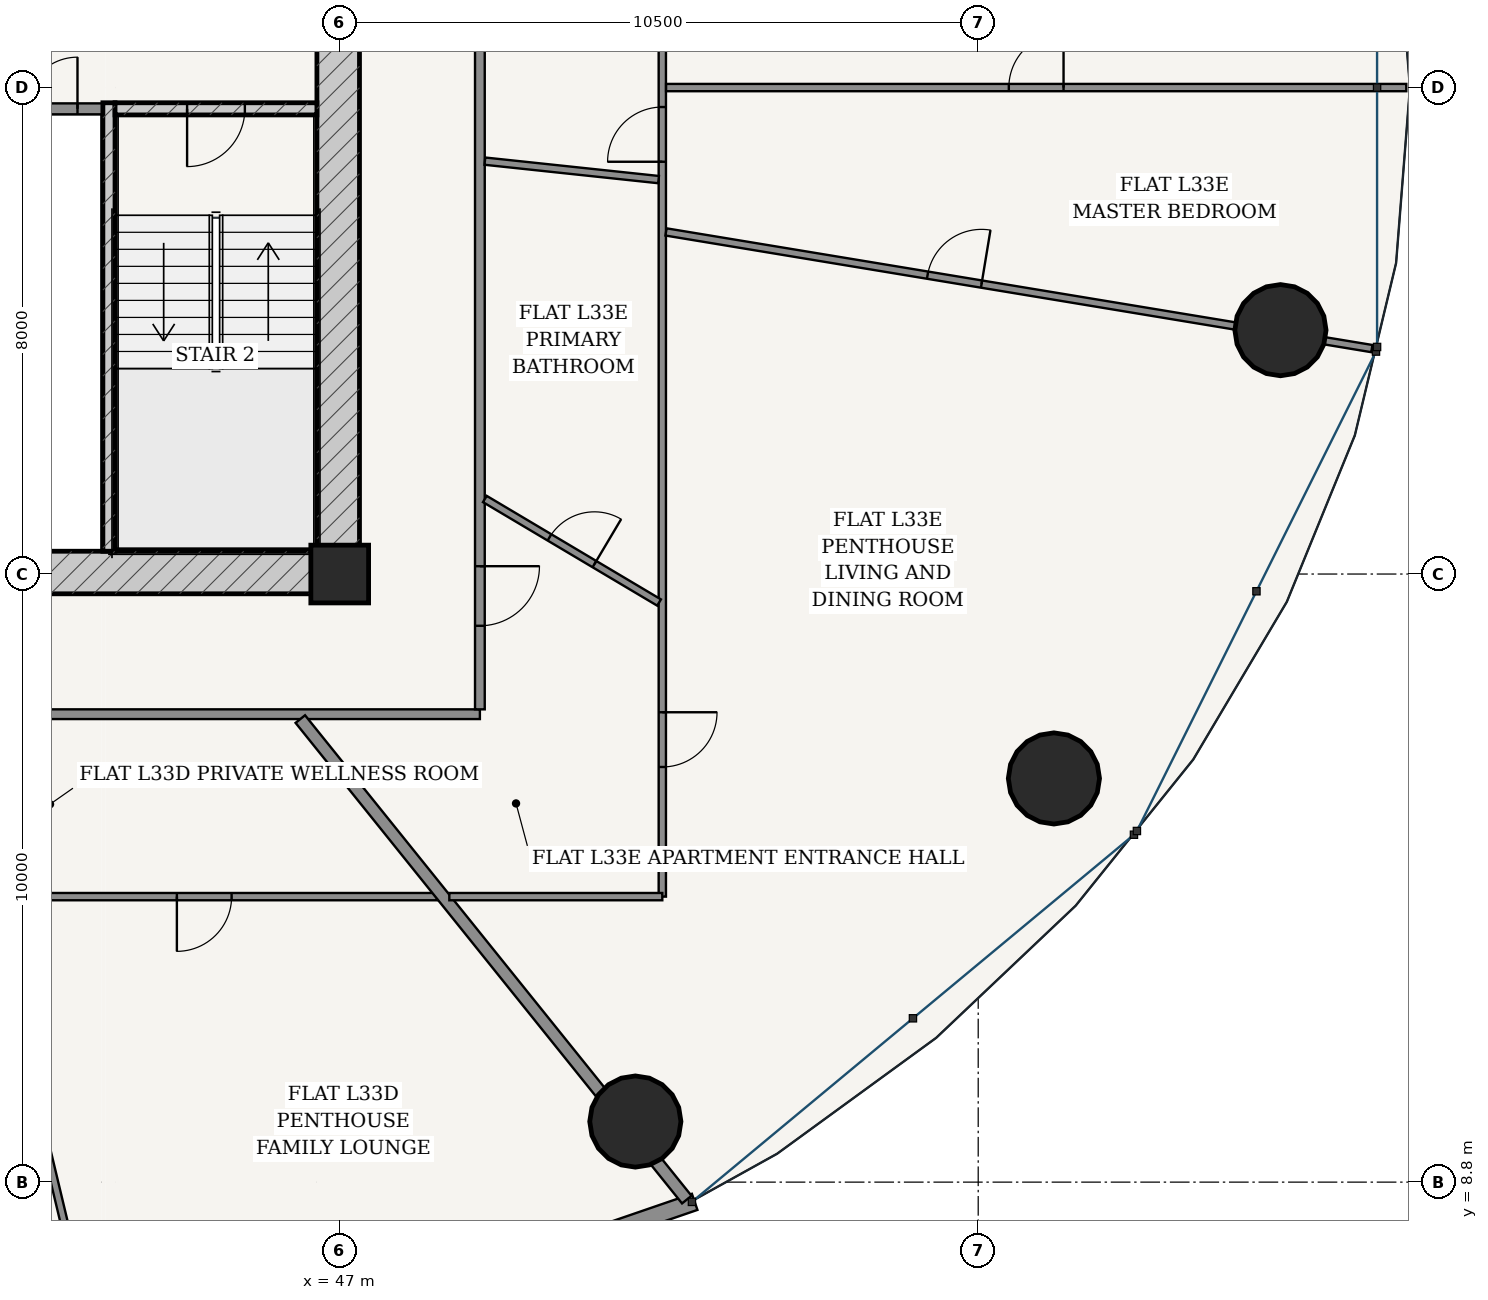
"""IFC4 building model, lengths in metres.
Left out: names, types, materials, properties, quantities, classifications, styles, units other than length and angle.
Written with IfcOpenShell. Run it as: python <this file> out.ifc"""

import sys

from ifc_helpers import new_model, si_unit, direction, frame, frame_2d, origin, origin_2d, place, context, subcontext, project, spatial, rectangle, hollow_circle, extrude, source, transform, mapped, element, fill, save


model = new_model("IFC4")
c1 = context("Model", 3, precision=1e-05, world=origin(), true_north=direction((-0.2419218956, 0.970295726276)))
c2 = subcontext(c1, "Body", "Model", "MODEL_VIEW")
j1 = project(units=[si_unit("LENGTHUNIT", "METRE"), si_unit("PLANEANGLEUNIT", "RADIAN")], contexts=[c1])
p1 = place(None, origin())
s1 = spatial("IfcSite", under=j1, at=p1, CompositionType="ELEMENT")
p2 = place(p1, origin())
s2 = spatial("IfcBuilding", under=s1, at=p2, CompositionType="ELEMENT")
p3 = place(p2, frame((0.0, 0.0, 126.6)))
s3 = spatial("IfcBuildingStorey", under=s2, at=p3, CompositionType="ELEMENT", Elevation=126.6)
p4 = place(p3, frame((47.0, 18.8, 0.0), z_axis=(0.0, 0.0, 1.0), x_axis=(1.0, 0.0, 0.0)))
e1 = element("IfcColumn", 1, at=p4, inside=s3, PredefinedType="COLUMN", context=c2, shape_type="SweptSolid", body=[
    extrude(rectangle(XDim=0.95, YDim=0.95, at=origin_2d()), origin(), (0.0, 0.0, 1.0), 3.6),
])
p5 = place(p3, frame((28.675, 18.825, 0.0), z_axis=(0.0, 0.0, 1.0), x_axis=(1.0, 0.0, 0.0)))
e2 = element("IfcWall", 2, at=p5, inside=s3, PredefinedType="SHEAR", context=c2, shape_type="SweptSolid", body=[
    extrude(rectangle(XDim=18.65, YDim=0.7, at=frame_2d((9.325, 0.0))), origin(), (0.0, 0.0, 1.0), 3.15),
])
p6 = place(p5, frame((8.9, 0.0, 0.0)))
e3 = element("IfcOpeningElement", 3, at=p6, cuts=e2, PredefinedType="OPENING", context=c2, shape_type="SweptSolid", body=[
    extrude(rectangle(XDim=0.85, YDim=2.1, at=frame_2d((0.425, 1.05))), frame((0.0, 0.36, 0.0), z_axis=(0.0, -1.0, 0.0), x_axis=(1.0, 0.0, 0.0)), (0.0, 0.0, 1.0), 0.72),
])
p7 = place(p3, frame((46.975, 19.175, 0.0), z_axis=(0.0, 0.0, 1.0), x_axis=(0.0, 1.0, 0.0)))
e4 = element("IfcWall", 4, at=p7, inside=s3, PredefinedType="SHEAR", context=c2, shape_type="SweptSolid", body=[
    extrude(rectangle(XDim=15.25, YDim=0.7, at=frame_2d((7.625, 0.0))), origin(), (0.0, 0.0, 1.0), 3.15),
])
p8 = place(p7, frame((9.875, 0.0, 0.0)))
e5 = element("IfcOpeningElement", 5, at=p8, cuts=e4, PredefinedType="OPENING", context=c2, shape_type="SweptSolid", body=[
    extrude(rectangle(XDim=1.5, YDim=2.2, at=frame_2d((0.75, 1.1))), frame((0.0, 0.36, 0.0), z_axis=(0.0, -1.0, 0.0), x_axis=(1.0, 0.0, 0.0)), (0.0, 0.0, 1.0), 0.72),
])
p9 = place(p3, frame((43.205, 19.175, 0.0), z_axis=(0.0, 0.0, 1.0), x_axis=(0.0, 1.0, 0.0)))
e6 = element("IfcWall", 6, at=p9, inside=s3, PredefinedType="SOLIDWALL", context=c2, shape_type="SweptSolid", body=[
    extrude(rectangle(XDim=7.375, YDim=0.2, at=frame_2d((3.688, 0.0))), origin(), (0.0, 0.0, 1.0), 3.15),
])
p10 = place(p3, frame((43.305, 26.45, 0.0), z_axis=(0.0, 0.0, 1.0), x_axis=(1.0, 0.0, 0.0)))
e7 = element("IfcWall", 7, at=p10, inside=s3, PredefinedType="SOLIDWALL", context=c2, shape_type="SweptSolid", body=[
    extrude(rectangle(XDim=3.32, YDim=0.2, at=frame_2d((1.66, 0.0))), origin(), (0.0, 0.0, 1.0), 3.15),
])
p11 = place(p10, frame((1.185, 0.0, 0.0)))
e8 = element("IfcOpeningElement", 8, at=p11, cuts=e7, PredefinedType="OPENING", context=c2, shape_type="SweptSolid", body=[
    extrude(rectangle(XDim=0.95, YDim=2.15, at=frame_2d((0.475, 1.075))), frame((0.0, 0.11, 0.0), z_axis=(0.0, -1.0, 0.0), x_axis=(1.0, 0.0, 0.0)), (0.0, 0.0, 1.0), 0.22),
])
for number, where, z_axis, x_axis in (
    (9, (51.862, 9.796, 0.0), (0.0, 0.0, 1.0), (1.0, 0.0, 0.0)),
    (10, (58.745, 15.438, 0.0), (0.0, 0.0, 1.0), (1.0, 0.0, 0.0)),
    (11, (62.471, 22.81, 0.0), (0.0, 0.0, 1.0), (1.0, 0.0, 0.0)),
):
    element("IfcColumn", number, at=place(p3, frame(where, z_axis=z_axis, x_axis=x_axis)), inside=s3, PredefinedType="COLUMN", context=c2, shape_type="SweptSolid", body=[
        extrude(hollow_circle(Radius=0.75, WallThickness=0.045, at=origin_2d()), origin(), (0.0, 0.0, 1.0), 3.6),
    ])
p12 = place(p3, frame((43.108, 5.128, 0.0), z_axis=(0.0, 0.0, 1.0), x_axis=(0.945590132341, 0.325360264351, 0.0)))
e12 = element("IfcWall", 12, at=p12, inside=s3, PredefinedType="SOLIDWALL", context=c2, shape_type="SweptSolid", body=[
    extrude(rectangle(XDim=10.289, YDim=0.28, at=frame_2d((5.145, 0.0))), origin(), (0.0, 0.0, 1.0), 3.15),
])
p13 = place(p12, frame((1.728, 0.0, 0.85)))
e13 = element("IfcOpeningElement", 13, at=p13, cuts=e12, PredefinedType="OPENING", context=c2, shape_type="SweptSolid", body=[
    extrude(rectangle(XDim=2.1, YDim=1.95, at=frame_2d((1.05, 0.975))), frame((0.0, 0.15, 0.0), z_axis=(0.0, -1.0, 0.0), x_axis=(1.0, 0.0, 0.0)), (0.0, 0.0, 1.0), 0.3),
])
p14 = place(p12, frame((6.461, 0.0, 0.85)))
e14 = element("IfcOpeningElement", 14, at=p14, cuts=e12, PredefinedType="OPENING", context=c2, shape_type="SweptSolid", body=[
    extrude(rectangle(XDim=2.1, YDim=1.95, at=frame_2d((1.05, 0.975))), frame((0.0, 0.15, 0.0), z_axis=(0.0, -1.0, 0.0), x_axis=(1.0, 0.0, 0.0)), (0.0, 0.0, 1.0), 0.3),
])
p15 = place(p3, frame((41.425, 26.45, 0.0), z_axis=(0.0, 0.0, 1.0), x_axis=(1.0, 0.0, 0.0)))
e15 = element("IfcWall", 15, at=p15, inside=s3, PredefinedType="PARTITIONING", context=c2, shape_type="SweptSolid", body=[
    extrude(rectangle(XDim=1.675, YDim=0.18, at=frame_2d((0.837, 0.0))), origin(), (0.0, 0.0, 1.0), 3.15),
])
p16 = place(p15, frame((0.413, 0.0, 0.0)))
e16 = element("IfcOpeningElement", 16, at=p16, cuts=e15, PredefinedType="OPENING", context=c2, shape_type="SweptSolid", body=[
    extrude(rectangle(XDim=0.85, YDim=2.1, at=frame_2d((0.425, 1.05))), frame((0.0, 0.1, 0.0), z_axis=(0.0, -1.0, 0.0), x_axis=(1.0, 0.0, 0.0)), (0.0, 0.0, 1.0), 0.2),
])
p17 = place(p3, frame((26.695, 16.495, 0.0), z_axis=(0.0, 0.0, 1.0), x_axis=(1.0, 0.0, 0.0)))
e17 = element("IfcWall", 17, at=p17, inside=s3, PredefinedType="PARTITIONING", context=c2, shape_type="SweptSolid", body=[
    extrude(rectangle(XDim=22.61, YDim=0.16, at=frame_2d((11.305, 0.0))), origin(), (0.0, 0.0, 1.0), 2.596),
])
p18 = place(p17, frame((4.883, 0.0, 0.0)))
e18 = element("IfcOpeningElement", 18, at=p18, cuts=e17, PredefinedType="OPENING", context=c2, shape_type="SweptSolid", body=[
    extrude(rectangle(XDim=0.98, YDim=2.2, at=frame_2d((0.49, 1.1))), frame((0.0, 0.09, 0.0), z_axis=(0.0, -1.0, 0.0), x_axis=(1.0, 0.0, 0.0)), (0.0, 0.0, 1.0), 0.18),
])
p19 = place(p3, frame((49.305, 16.575, 0.0), z_axis=(0.0, 0.0, 1.0), x_axis=(0.0, 1.0, 0.0)))
e19 = element("IfcWall", 19, at=p19, inside=s3, PredefinedType="PARTITIONING", context=c2, shape_type="SweptSolid", body=[
    extrude(rectangle(XDim=20.45, YDim=0.16, at=frame_2d((10.225, 0.0))), origin(), (0.0, 0.0, 1.0), 2.596),
])
p20 = place(p19, frame((17.66, 0.0, 0.0)))
e20 = element("IfcOpeningElement", 20, at=p20, cuts=e19, PredefinedType="OPENING", context=c2, shape_type="SweptSolid", body=[
    extrude(rectangle(XDim=0.98, YDim=2.2, at=frame_2d((0.49, 1.1))), frame((0.0, 0.09, 0.0), z_axis=(0.0, -1.0, 0.0), x_axis=(1.0, 0.0, 0.0)), (0.0, 0.0, 1.0), 0.18),
])
p21 = place(p19, frame((1.374, 0.0, 0.0)))
e21 = element("IfcOpeningElement", 21, at=p21, cuts=e19, PredefinedType="OPENING", context=c2, shape_type="SweptSolid", body=[
    extrude(rectangle(XDim=0.98, YDim=2.2, at=frame_2d((0.49, 1.1))), frame((0.0, 0.09, 0.0), z_axis=(0.0, -1.0, 0.0), x_axis=(1.0, 0.0, 0.0)), (0.0, 0.0, 1.0), 0.18),
])
p22 = place(p3, frame((48.598, 13.495, 0.0), z_axis=(0.0, 0.0, 1.0), x_axis=(-1.0, 0.0, 0.0)))
e22 = element("IfcWall", 22, at=p22, inside=s3, PredefinedType="PARTITIONING", context=c2, shape_type="SweptSolid", body=[
    extrude(rectangle(XDim=24.903, YDim=0.12, at=frame_2d((12.452, 0.0))), origin(), (0.0, 0.0, 1.0), 2.596),
])
p23 = place(p22, frame((17.72, 0.0, 0.0)))
e23 = element("IfcOpeningElement", 23, at=p23, cuts=e22, PredefinedType="OPENING", context=c2, shape_type="SweptSolid", body=[
    extrude(rectangle(XDim=0.9, YDim=2.15, at=frame_2d((0.45, 1.075))), frame((0.0, 0.07, 0.0), z_axis=(0.0, -1.0, 0.0), x_axis=(1.0, 0.0, 0.0)), (0.0, 0.0, 1.0), 0.14),
])
p24 = place(p22, frame((11.637, 0.0, 0.0)))
e24 = element("IfcOpeningElement", 24, at=p24, cuts=e22, PredefinedType="OPENING", context=c2, shape_type="SweptSolid", body=[
    extrude(rectangle(XDim=0.9, YDim=2.15, at=frame_2d((0.45, 1.075))), frame((0.0, 0.07, 0.0), z_axis=(0.0, -1.0, 0.0), x_axis=(1.0, 0.0, 0.0)), (0.0, 0.0, 1.0), 0.14),
])
p25 = place(p22, frame((3.376, 0.0, 0.0)))
e25 = element("IfcOpeningElement", 25, at=p25, cuts=e22, PredefinedType="OPENING", context=c2, shape_type="SweptSolid", body=[
    extrude(rectangle(XDim=0.9, YDim=2.15, at=frame_2d((0.45, 1.075))), frame((0.0, 0.07, 0.0), z_axis=(0.0, -1.0, 0.0), x_axis=(1.0, 0.0, 0.0)), (0.0, 0.0, 1.0), 0.14),
])
p26 = place(p3, frame((41.2, 13.435, 0.0), z_axis=(0.0, 0.0, 1.0), x_axis=(0.232814779051, -0.972521094196, 0.0)))
e26 = element("IfcWall", 26, at=p26, inside=s3, PredefinedType="PARTITIONING", context=c2, shape_type="SweptSolid", body=[
    extrude(rectangle(XDim=8.438, YDim=0.12, at=frame_2d((4.219, 0.0))), origin(), (0.0, 0.0, 1.0), 2.5),
])
p27 = place(p3, frame((46.352, 16.415, 0.0), z_axis=(0.0, 0.0, 1.0), x_axis=(0.626701127389, -0.779259710834, 0.0)))
e27 = element("IfcWall", 27, at=p27, inside=s3, PredefinedType="PARTITIONING", context=c2, shape_type="SweptSolid", body=[
    extrude(rectangle(XDim=10.141, YDim=0.2, at=frame_2d((5.071, 0.0))), origin(), (0.0, 0.0, 1.0), 2.5),
])
p28 = place(p3, frame((52.305, 29.062, 0.0), z_axis=(0.0, 0.0, 1.0), x_axis=(0.0, -1.0, 0.0)))
e28 = element("IfcWall", 28, at=p28, inside=s3, PredefinedType="PARTITIONING", context=c2, shape_type="SweptSolid", body=[
    extrude(rectangle(XDim=15.567, YDim=0.12, at=frame_2d((7.783, 0.0))), origin(), (0.0, 0.0, 1.0), 2.596),
])
p29 = place(p28, frame((12.535, 0.0, 0.0)))
e29 = element("IfcOpeningElement", 29, at=p29, cuts=e28, PredefinedType="OPENING", context=c2, shape_type="SweptSolid", body=[
    extrude(rectangle(XDim=0.9, YDim=2.15, at=frame_2d((0.45, 1.075))), frame((0.0, 0.07, 0.0), z_axis=(0.0, -1.0, 0.0), x_axis=(1.0, 0.0, 0.0)), (0.0, 0.0, 1.0), 0.14),
])
p30 = place(p28, frame((2.582, 0.0, 0.0)))
e30 = element("IfcOpeningElement", 30, at=p30, cuts=e28, PredefinedType="OPENING", context=c2, shape_type="SweptSolid", body=[
    extrude(rectangle(XDim=0.9, YDim=2.15, at=frame_2d((0.45, 1.075))), frame((0.0, 0.07, 0.0), z_axis=(0.0, -1.0, 0.0), x_axis=(1.0, 0.0, 0.0)), (0.0, 0.0, 1.0), 0.14),
])
p31 = place(p3, frame((52.305, 13.495, 0.0), z_axis=(0.0, 0.0, 1.0), x_axis=(-1.0, 0.0, 0.0)))
e31 = element("IfcWall", 31, at=p31, inside=s3, PredefinedType="PARTITIONING", context=c2, shape_type="SweptSolid", body=[
    extrude(rectangle(XDim=3.503, YDim=0.12, at=frame_2d((1.751, 0.0))), origin(), (0.0, 0.0, 1.0), 2.596),
])
p32 = place(p3, frame((52.366, 24.426, 0.0), z_axis=(0.0, 0.0, 1.0), x_axis=(0.986619012175, -0.163042708564, 0.0)))
e32 = element("IfcWall", 32, at=p32, inside=s3, PredefinedType="PARTITIONING", context=c2, shape_type="SweptSolid", body=[
    extrude(rectangle(XDim=11.765, YDim=0.12, at=frame_2d((5.883, 0.0))), origin(), (0.0, 0.0, 1.0), 2.5),
])
p33 = place(p32, frame((4.359, 0.0, 0.0)))
e33 = element("IfcOpeningElement", 33, at=p33, cuts=e32, PredefinedType="OPENING", context=c2, shape_type="SweptSolid", body=[
    extrude(rectangle(XDim=0.9, YDim=2.15, at=frame_2d((0.45, 1.075))), frame((0.0, 0.07, 0.0), z_axis=(0.0, -1.0, 0.0), x_axis=(1.0, 0.0, 0.0)), (0.0, 0.0, 1.0), 0.14),
])
p34 = place(p3, frame((52.367, 26.8, 0.0), z_axis=(0.0, 0.0, 1.0), x_axis=(1.0, 0.0, 0.0)))
e34 = element("IfcWall", 34, at=p34, inside=s3, PredefinedType="PARTITIONING", context=c2, shape_type="SweptSolid", body=[
    extrude(rectangle(XDim=12.173, YDim=0.12, at=frame_2d((6.086, 0.0))), origin(), (0.0, 0.0, 1.0), 2.666),
])
p35 = place(p34, frame((5.636, 0.0, 0.0)))
e35 = element("IfcOpeningElement", 35, at=p35, cuts=e34, PredefinedType="OPENING", context=c2, shape_type="SweptSolid", body=[
    extrude(rectangle(XDim=0.9, YDim=2.15, at=frame_2d((0.45, 1.075))), frame((0.0, 0.07, 0.0), z_axis=(0.0, -1.0, 0.0), x_axis=(1.0, 0.0, 0.0)), (0.0, 0.0, 1.0), 0.14),
])
p36 = place(p3, frame((49.387, 20.034, 0.0), z_axis=(0.0, 0.0, 1.0), x_axis=(0.859682842925, -0.510828160521, 0.0)))
e36 = element("IfcWall", 36, at=p36, inside=s3, PredefinedType="PARTITIONING", context=c2, shape_type="SweptSolid", body=[
    extrude(rectangle(XDim=3.333, YDim=0.12, at=frame_2d((1.666, 0.0))), origin(), (0.0, 0.0, 1.0), 2.825),
])
p37 = place(p36, frame((1.236, 0.0, 0.0)))
e37 = element("IfcOpeningElement", 37, at=p37, cuts=e36, PredefinedType="OPENING", context=c2, shape_type="SweptSolid", body=[
    extrude(rectangle(XDim=0.86, YDim=2.15, at=frame_2d((0.43, 1.075))), frame((0.0, 0.07, 0.0), z_axis=(0.0, -1.0, 0.0), x_axis=(1.0, 0.0, 0.0)), (0.0, 0.0, 1.0), 0.14),
])
p38 = place(p3, frame((49.387, 25.59, 0.0), z_axis=(0.0, 0.0, 1.0), x_axis=(0.99440393079, -0.105644793673, 0.0)))
e38 = element("IfcWall", 38, at=p38, inside=s3, PredefinedType="PARTITIONING", context=c2, shape_type="SweptSolid", body=[
    extrude(rectangle(XDim=2.873, YDim=0.12, at=frame_2d((1.436, 0.0))), origin(), (0.0, 0.0, 1.0), 3.15),
])
m1 = source(origin(), c2, "Body", "SweptSolid", [
    extrude(rectangle(XDim=0.95, YDim=2.15, at=frame_2d((0.475, 1.075))), frame((0.0, 0.025, 0.0), z_axis=(0.0, -1.0, 0.0), x_axis=(1.0, 0.0, 0.0)), (0.0, 0.0, 1.0), 0.05),
])
p39 = place(p11, frame((0.95, 0.0, 0.0), z_axis=(0.0, 0.0, 1.0), x_axis=(-1.0, 0.0, 0.0)))
e39 = element("IfcDoor", 39, at=p39, inside=s3, OperationType="SINGLE_SWING_RIGHT", PredefinedType="DOOR", context=c2, shape_type="MappedRepresentation", body=[
    mapped(m1, transform((0.0, 0.0, 0.0), scale=1.0)),
])
fill(e8, e39)
m2 = source(origin(), c2, "Body", "SweptSolid", [
    extrude(rectangle(XDim=0.85, YDim=2.1, at=frame_2d((0.425, 1.05))), frame((0.0, 0.025, 0.0), z_axis=(0.0, -1.0, 0.0), x_axis=(1.0, 0.0, 0.0)), (0.0, 0.0, 1.0), 0.05),
])
p40 = place(p16, origin())
e40 = element("IfcDoor", 40, at=p40, inside=s3, OperationType="SINGLE_SWING_RIGHT", PredefinedType="DOOR", context=c2, shape_type="MappedRepresentation", body=[
    mapped(m2, transform((0.0, 0.0, 0.0), scale=1.0)),
])
fill(e16, e40)
m3 = source(origin(), c2, "Body", "SweptSolid", [
    extrude(rectangle(XDim=0.9, YDim=2.15, at=frame_2d((0.45, 1.075))), frame((0.0, 0.025, 0.0), z_axis=(0.0, -1.0, 0.0), x_axis=(1.0, 0.0, 0.0)), (0.0, 0.0, 1.0), 0.05),
])
p41 = place(p25, origin())
e41 = element("IfcDoor", 41, at=p41, inside=s3, OperationType="SINGLE_SWING_RIGHT", PredefinedType="DOOR", context=c2, shape_type="MappedRepresentation", body=[
    mapped(m3, transform((0.0, 0.0, 0.0), scale=1.0)),
])
fill(e25, e41)
m4 = source(origin(), c2, "Body", "SweptSolid", [
    extrude(rectangle(XDim=0.98, YDim=2.2, at=frame_2d((0.49, 1.1))), frame((0.0, 0.025, 0.0), z_axis=(0.0, -1.0, 0.0), x_axis=(1.0, 0.0, 0.0)), (0.0, 0.0, 1.0), 0.05),
])
p42 = place(p21, frame((0.98, 0.0, 0.0), z_axis=(0.0, 0.0, 1.0), x_axis=(-1.0, 0.0, 0.0)))
e42 = element("IfcDoor", 42, at=p42, inside=s3, OperationType="SINGLE_SWING_LEFT", PredefinedType="DOOR", context=c2, shape_type="MappedRepresentation", body=[
    mapped(m4, transform((0.0, 0.0, 0.0), scale=1.0)),
])
fill(e21, e42)
m5 = source(origin(), c2, "Body", "SweptSolid", [
    extrude(rectangle(XDim=0.86, YDim=2.15, at=frame_2d((0.43, 1.075))), frame((0.0, 0.025, 0.0), z_axis=(0.0, -1.0, 0.0), x_axis=(1.0, 0.0, 0.0)), (0.0, 0.0, 1.0), 0.05),
])
p43 = place(p37, origin())
e43 = element("IfcDoor", 43, at=p43, inside=s3, OperationType="SINGLE_SWING_RIGHT", PredefinedType="DOOR", context=c2, shape_type="MappedRepresentation", body=[
    mapped(m5, transform((0.0, 0.0, 0.0), scale=1.0)),
])
fill(e37, e43)
p44 = place(p29, origin())
e44 = element("IfcDoor", 44, at=p44, inside=s3, OperationType="SINGLE_SWING_LEFT", PredefinedType="DOOR", context=c2, shape_type="MappedRepresentation", body=[
    mapped(m3, transform((0.0, 0.0, 0.0), scale=1.0)),
])
fill(e29, e44)
p45 = place(p33, origin())
e45 = element("IfcDoor", 45, at=p45, inside=s3, OperationType="SINGLE_SWING_RIGHT", PredefinedType="DOOR", context=c2, shape_type="MappedRepresentation", body=[
    mapped(m3, transform((0.0, 0.0, 0.0), scale=1.0)),
])
fill(e33, e45)
p46 = place(p30, frame((0.9, 0.0, 0.0), z_axis=(0.0, 0.0, 1.0), x_axis=(-1.0, 0.0, 0.0)))
e46 = element("IfcDoor", 46, at=p46, inside=s3, OperationType="SINGLE_SWING_LEFT", PredefinedType="DOOR", context=c2, shape_type="MappedRepresentation", body=[
    mapped(m3, transform((0.0, 0.0, 0.0), scale=1.0)),
])
fill(e30, e46)
p47 = place(p35, origin())
e47 = element("IfcDoor", 47, at=p47, inside=s3, OperationType="SINGLE_SWING_RIGHT", PredefinedType="DOOR", context=c2, shape_type="MappedRepresentation", body=[
    mapped(m3, transform((0.0, 0.0, 0.0), scale=1.0)),
])
fill(e35, e47)
save(model, sys.argv[1])
